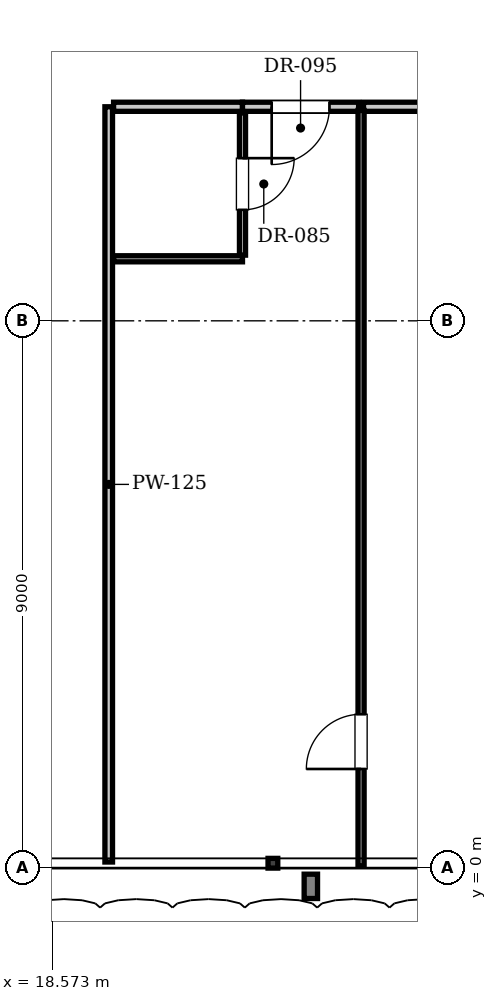
"""IFC4 building model, lengths in metres.
Left out: names, types, materials, properties, quantities, classifications, styles, units other than length and angle.
Written with IfcOpenShell. Run it as: python <this file> out.ifc"""

import sys

from ifc_helpers import new_model, si_unit, direction, frame, frame_2d, origin, place, context, subcontext, project, spatial, rectangle, extrude, element, fill, save


model = new_model("IFC4")
c1 = context("Model", 3, precision=1e-05, world=origin(), true_north=direction((0.0, 1.0)))
c2 = subcontext(c1, "Body", "Model", "MODEL_VIEW")
j1 = project(units=[si_unit("LENGTHUNIT", "METRE"), si_unit("PLANEANGLEUNIT", "RADIAN")], contexts=[c1])
p1 = place(None, origin())
s1 = spatial("IfcSite", under=j1, at=p1, CompositionType="ELEMENT")
p2 = place(p1, origin())
s2 = spatial("IfcBuilding", under=s1, at=p2, CompositionType="ELEMENT")
p3 = place(p2, frame((0.0, 0.0, 30.8)))
s3 = spatial("IfcBuildingStorey", under=s2, at=p3, CompositionType="ELEMENT", Elevation=30.8)
p4 = place(p3, frame((19.5, 0.1, 0.0), z_axis=(0.0, 0.0, 1.0), x_axis=(0.0, 1.0, 0.0)))
e1 = element("IfcWall", 1, at=p4, inside=s3, PredefinedType="PARTITIONING", context=c2, shape_type="SweptSolid", body=[
    extrude(rectangle(XDim=12.42, YDim=0.125, at=frame_2d((6.21, 0.0))), origin(), (0.0, 0.0, 1.0), 3.61),
])
p5 = place(p3, frame((19.58, 12.52, 0.0), z_axis=(0.0, 0.0, 1.0), x_axis=(1.0, 0.0, 0.0)))
e2 = element("IfcWall", 2, at=p5, inside=s3, PredefinedType="PARTITIONING", context=c2, shape_type="SweptSolid", body=[
    extrude(rectangle(XDim=2.12, YDim=0.15, at=frame_2d((1.06, 0.0))), origin(), (0.0, 0.0, 1.0), 3.61),
])
p6 = place(p3, frame((19.58, 10.02, 0.0), z_axis=(0.0, 0.0, 1.0), x_axis=(1.0, 0.0, 0.0)))
e3 = element("IfcWall", 3, at=p6, inside=s3, PredefinedType="PARTITIONING", context=c2, shape_type="SweptSolid", body=[
    extrude(rectangle(XDim=2.12, YDim=0.1, at=frame_2d((1.06, 0.0))), origin(), (0.0, 0.0, 1.0), 3.61),
])
p7 = place(p3, frame((21.7, 10.08, 0.0), z_axis=(0.0, 0.0, 1.0), x_axis=(0.0, 1.0, 0.0)))
e4 = element("IfcWall", 4, at=p7, inside=s3, PredefinedType="PARTITIONING", context=c2, shape_type="SweptSolid", body=[
    extrude(rectangle(XDim=2.34, YDim=0.1, at=frame_2d((1.17, 0.0))), origin(), (0.0, 0.0, 1.0), 3.61),
])
p8 = place(p7, frame((0.745, 0.0, 0.0)))
e5 = element("IfcOpeningElement", 5, at=p8, cuts=e4, PredefinedType="OPENING", context=c2, shape_type="SweptSolid", body=[
    extrude(rectangle(XDim=0.85, YDim=2.1, at=frame_2d((0.425, 1.05))), frame((0.0, 0.06, 0.0), z_axis=(0.0, -1.0, 0.0), x_axis=(1.0, 0.0, 0.0)), (0.0, 0.0, 1.0), 0.12),
])
p9 = place(p3, frame((21.7, 12.52, 0.0), z_axis=(0.0, 0.0, 1.0), x_axis=(1.0, 0.0, 0.0)))
e6 = element("IfcWall", 6, at=p9, inside=s3, PredefinedType="PARTITIONING", context=c2, shape_type="SweptSolid", body=[
    extrude(rectangle(XDim=1.91, YDim=0.15, at=frame_2d((0.955, 0.0))), origin(), (0.0, 0.0, 1.0), 3.61),
])
p10 = place(p9, frame((0.48, 0.0, 0.0)))
e7 = element("IfcOpeningElement", 7, at=p10, cuts=e6, PredefinedType="OPENING", context=c2, shape_type="SweptSolid", body=[
    extrude(rectangle(XDim=0.95, YDim=2.15, at=frame_2d((0.475, 1.075))), frame((0.0, 0.085, 0.0), z_axis=(0.0, -1.0, 0.0), x_axis=(1.0, 0.0, 0.0)), (0.0, 0.0, 1.0), 0.17),
])
p11 = place(p3, frame((23.69, 12.52, 0.0), z_axis=(0.0, 0.0, 1.0), x_axis=(1.0, 0.0, 0.0)))
e8 = element("IfcWall", 8, at=p11, inside=s3, PredefinedType="PARTITIONING", context=c2, shape_type="SweptSolid", body=[
    extrude(rectangle(XDim=1.89, YDim=0.15, at=frame_2d((0.945, 0.0))), origin(), (0.0, 0.0, 1.0), 3.61),
])
p12 = place(p3, frame((23.65, 0.03, 0.0), z_axis=(0.0, 0.0, 1.0), x_axis=(0.0, 1.0, 0.0)))
e9 = element("IfcWall", 9, at=p12, inside=s3, PredefinedType="PARTITIONING", context=c2, shape_type="SweptSolid", body=[
    extrude(rectangle(XDim=12.43, YDim=0.1, at=frame_2d((6.215, 0.0))), origin(), (0.0, 0.0, 1.0), 3.61),
])
p13 = place(p12, frame((1.6, 0.0, 0.0)))
e10 = element("IfcOpeningElement", 10, at=p13, cuts=e9, PredefinedType="OPENING", context=c2, shape_type="SweptSolid", body=[
    extrude(rectangle(XDim=0.9, YDim=2.1, at=frame_2d((0.45, 1.05))), frame((0.0, 0.06, 0.0), z_axis=(0.0, -1.0, 0.0), x_axis=(1.0, 0.0, 0.0)), (0.0, 0.0, 1.0), 0.12),
])
p14 = place(p8, frame((0.85, 0.0, 0.0), z_axis=(0.0, 0.0, 1.0), x_axis=(-1.0, 0.0, 0.0)))
e11 = element("IfcDoor", 11, at=p14, inside=s3, OperationType="SINGLE_SWING_LEFT", PredefinedType="DOOR", context=c2, shape_type="SweptSolid", body=[
    extrude(rectangle(XDim=0.85, YDim=2.1, at=frame_2d((0.425, 1.05))), frame((0.0, 0.025, 0.0), z_axis=(0.0, -1.0, 0.0), x_axis=(1.0, 0.0, 0.0)), (0.0, 0.0, 1.0), 0.05),
])
fill(e5, e11)
p15 = place(p10, frame((0.95, 0.0, 0.0), z_axis=(0.0, 0.0, 1.0), x_axis=(-1.0, 0.0, 0.0)))
e12 = element("IfcDoor", 12, at=p15, inside=s3, OperationType="SINGLE_SWING_RIGHT", PredefinedType="DOOR", context=c2, shape_type="SweptSolid", body=[
    extrude(rectangle(XDim=0.95, YDim=2.15, at=frame_2d((0.475, 1.075))), frame((0.0, 0.025, 0.0), z_axis=(0.0, -1.0, 0.0), x_axis=(1.0, 0.0, 0.0)), (0.0, 0.0, 1.0), 0.05),
])
fill(e7, e12)
p16 = place(p13, origin())
e13 = element("IfcDoor", 13, at=p16, inside=s3, OperationType="SINGLE_SWING_LEFT", PredefinedType="DOOR", context=c2, shape_type="SweptSolid", body=[
    extrude(rectangle(XDim=0.9, YDim=2.1, at=frame_2d((0.45, 1.05))), frame((0.0, 0.025, 0.0), z_axis=(0.0, -1.0, 0.0), x_axis=(1.0, 0.0, 0.0)), (0.0, 0.0, 1.0), 0.05),
])
fill(e10, e13)
save(model, sys.argv[1])
